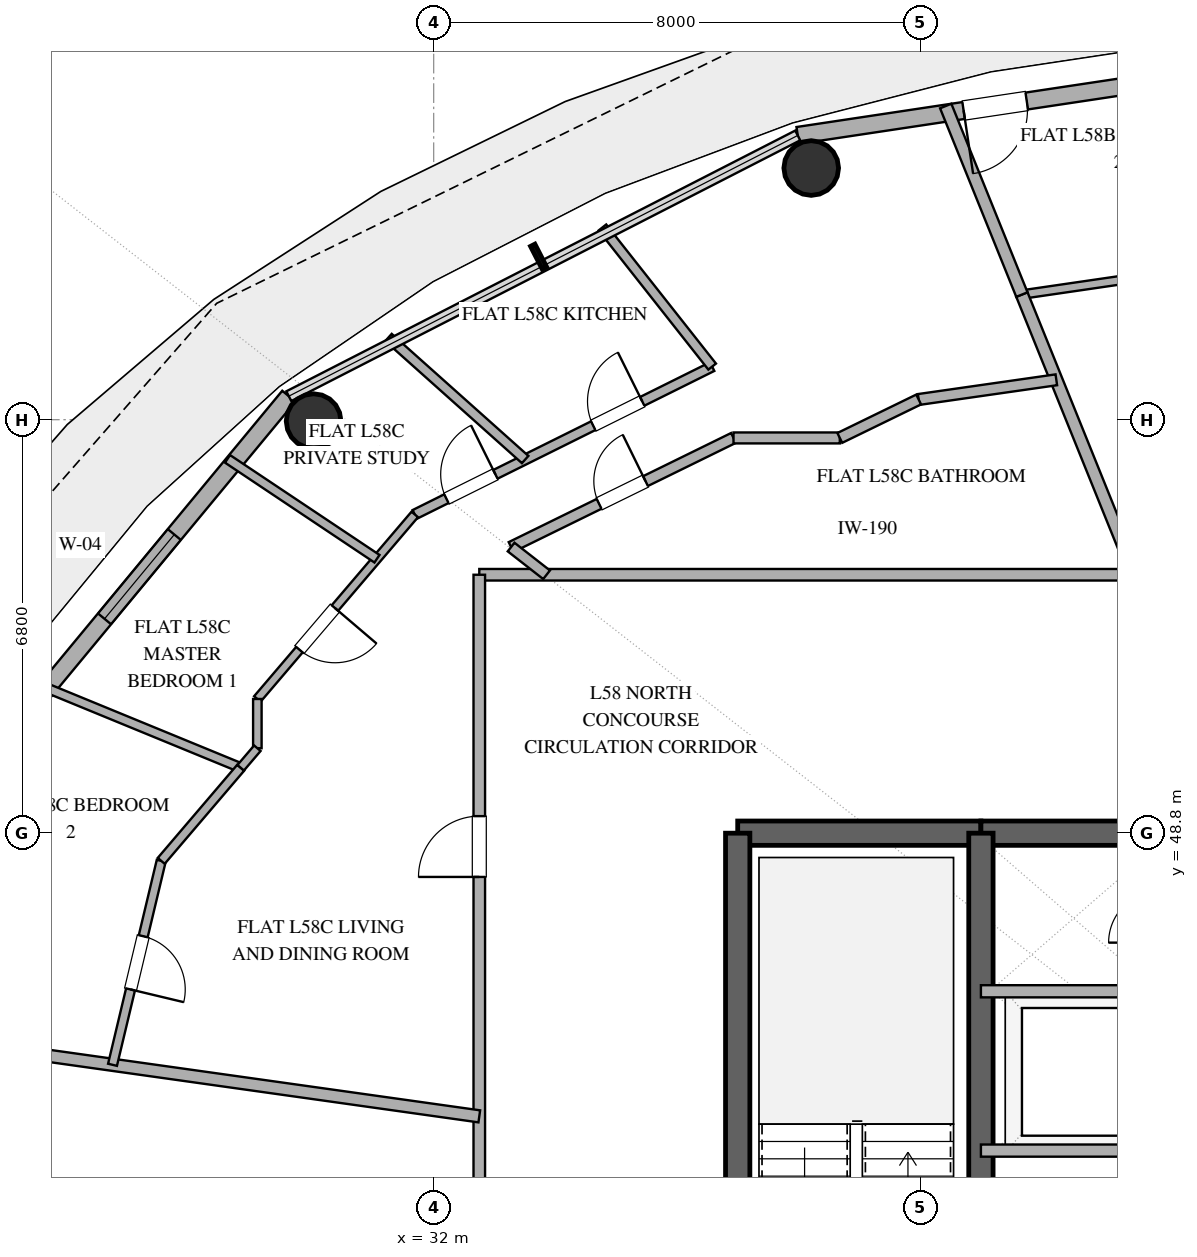
"""IFC4 building model, lengths in metres.
Left out: names, types, materials, properties, quantities, classifications, styles, units other than length and angle.
Written with IfcOpenShell. Run it as: python <this file> out.ifc"""

import sys

from ifc_helpers import new_model, si_unit, direction, frame, frame_2d, origin, origin_2d, place, context, subcontext, project, spatial, rectangle, hollow_circle, extrude, element, fill, save


model = new_model("IFC4")
c1 = context("Model", 3, precision=1e-05, world=origin(), true_north=direction((0.0, 1.0)))
c2 = subcontext(c1, "Body", "Model", "MODEL_VIEW")
j1 = project(units=[si_unit("LENGTHUNIT", "METRE"), si_unit("PLANEANGLEUNIT", "RADIAN")], contexts=[c1])
p1 = place(None, origin())
s1 = spatial("IfcSite", under=j1, at=p1, CompositionType="ELEMENT")
p2 = place(p1, origin())
s2 = spatial("IfcBuilding", under=s1, at=p2, CompositionType="ELEMENT")
p3 = place(p2, frame((0.0, 0.0, 228.0)))
s3 = spatial("IfcBuildingStorey", under=s2, at=p3, CompositionType="ELEMENT", Elevation=228.0)
p4 = place(p3, frame((37.0, 48.8, 0.0), z_axis=(0.0, 0.0, 1.0), x_axis=(1.0, 0.0, 0.0)))
e1 = element("IfcWall", 1, at=p4, inside=s3, PredefinedType="SHEAR", context=c2, shape_type="SweptSolid", body=[
    extrude(rectangle(XDim=4.0, YDim=0.4, at=frame_2d((2.0, 0.0))), origin(), (0.0, 0.0, 1.0), 3.36),
])
p5 = place(p3, frame((41.0, 48.8, 0.0), z_axis=(0.0, 0.0, 1.0), x_axis=(1.0, 0.0, 0.0)))
e2 = element("IfcWall", 2, at=p5, inside=s3, PredefinedType="SHEAR", context=c2, shape_type="SweptSolid", body=[
    extrude(rectangle(XDim=14.0, YDim=0.4, at=frame_2d((7.0, 0.0))), origin(), (0.0, 0.0, 1.0), 3.36),
])
p6 = place(p5, frame((6.1, 0.0, 0.0)))
e3 = element("IfcOpeningElement", 3, at=p6, cuts=e2, PredefinedType="OPENING", context=c2, shape_type="SweptSolid", body=[
    extrude(rectangle(XDim=1.8, YDim=2.25, at=frame_2d((0.9, 1.125))), frame((0.0, 0.21, 0.0), z_axis=(0.0, -1.0, 0.0), x_axis=(1.0, 0.0, 0.0)), (0.0, 0.0, 1.0), 0.42),
])
p7 = place(p3, frame((37.0, 35.2, 0.0), z_axis=(0.0, 0.0, 1.0), x_axis=(0.0, 1.0, 0.0)))
e4 = element("IfcWall", 4, at=p7, inside=s3, PredefinedType="SHEAR", context=c2, shape_type="SweptSolid", body=[
    extrude(rectangle(XDim=13.6, YDim=0.4, at=frame_2d((6.8, 0.0))), origin(), (0.0, 0.0, 1.0), 3.36),
])
p8 = place(p3, frame((41.0, 35.2, 0.0), z_axis=(0.0, 0.0, 1.0), x_axis=(0.0, 1.0, 0.0)))
e5 = element("IfcWall", 5, at=p8, inside=s3, PredefinedType="SHEAR", context=c2, shape_type="SweptSolid", body=[
    extrude(rectangle(XDim=13.6, YDim=0.4, at=frame_2d((6.8, 0.0))), origin(), (0.0, 0.0, 1.0), 3.36),
])
p9 = place(p8, frame((1.15, 0.0, 0.0)))
e6 = element("IfcOpeningElement", 6, at=p9, cuts=e5, PredefinedType="OPENING", context=c2, shape_type="SweptSolid", body=[
    extrude(rectangle(XDim=1.1, YDim=2.2, at=frame_2d((0.55, 1.1))), frame((0.0, 0.21, 0.0), z_axis=(0.0, -1.0, 0.0), x_axis=(1.0, 0.0, 0.0)), (0.0, 0.0, 1.0), 0.42),
])
for number, where, z_axis, x_axis in (
    (7, (38.209, 59.739, 0.0), (0.0, 0.0, 1.0), (1.0, 0.0, 0.0)),
    (8, (30.025, 55.576, 0.0), (0.0, 0.0, 1.0), (1.0, 0.0, 0.0)),
):
    element("IfcColumn", number, at=place(p3, frame(where, z_axis=z_axis, x_axis=x_axis)), inside=s3, PredefinedType="COLUMN", context=c2, shape_type="SweptSolid", body=[
        extrude(hollow_circle(Radius=0.45, WallThickness=0.025, at=origin_2d()), origin(), (0.0, 0.0, 1.0), 3.36),
    ])
p10 = place(p3, frame((48.0, 61.78, 0.0), z_axis=(0.0, 0.0, 1.0), x_axis=(-0.988882522213, -0.148698881169, 0.0)))
e9 = element("IfcWall", 9, at=p10, inside=s3, PredefinedType="SOLIDWALL", context=c2, shape_type="SweptSolid", body=[
    extrude(rectangle(XDim=10.125, YDim=0.28, at=frame_2d((5.062, 0.0))), origin(), (0.0, 0.0, 1.0), 3.36),
])
p11 = place(p10, frame((6.317, 0.0, 0.0)))
e10 = element("IfcOpeningElement", 10, at=p11, cuts=e9, PredefinedType="OPENING", context=c2, shape_type="SweptSolid", body=[
    extrude(rectangle(XDim=1.05, YDim=2.2, at=frame_2d((0.525, 1.1))), frame((0.0, 0.15, 0.0), z_axis=(0.0, -1.0, 0.0), x_axis=(1.0, 0.0, 0.0)), (0.0, 0.0, 1.0), 0.3),
])
p12 = place(p10, frame((0.866, 0.0, 0.85)))
e11 = element("IfcOpeningElement", 11, at=p12, cuts=e9, PredefinedType="OPENING", context=c2, shape_type="SweptSolid", body=[
    extrude(rectangle(XDim=1.0, YDim=1.8, at=frame_2d((0.5, 0.9))), frame((0.0, 0.15, 0.0), z_axis=(0.0, -1.0, 0.0), x_axis=(1.0, 0.0, 0.0)), (0.0, 0.0, 1.0), 0.3),
])
p13 = place(p3, frame((29.617, 55.987, 0.0), z_axis=(0.0, 0.0, 1.0), x_axis=(-0.63761509934, -0.770355103243, 0.0)))
e12 = element("IfcWall", 12, at=p13, inside=s3, PredefinedType="SOLIDWALL", context=c2, shape_type="SweptSolid", body=[
    extrude(rectangle(XDim=8.33, YDim=0.28, at=frame_2d((4.165, 0.0))), origin(), (0.0, 0.0, 1.0), 3.36),
])
p14 = place(p13, frame((2.953, 0.0, 0.85)))
e13 = element("IfcOpeningElement", 13, at=p14, cuts=e12, PredefinedType="OPENING", context=c2, shape_type="SweptSolid", body=[
    extrude(rectangle(XDim=1.8, YDim=2.2, at=frame_2d((0.9, 1.1))), frame((0.0, 0.15, 0.0), z_axis=(0.0, -1.0, 0.0), x_axis=(1.0, 0.0, 0.0)), (0.0, 0.0, 1.0), 0.3),
])
p15 = place(p13, frame((6.536, 0.0, 0.85)))
e14 = element("IfcOpeningElement", 14, at=p15, cuts=e12, PredefinedType="OPENING", context=c2, shape_type="SweptSolid", body=[
    extrude(rectangle(XDim=0.85, YDim=1.8, at=frame_2d((0.425, 0.9))), frame((0.0, 0.15, 0.0), z_axis=(0.0, -1.0, 0.0), x_axis=(1.0, 0.0, 0.0)), (0.0, 0.0, 1.0), 0.3),
])
for number, where, z_axis, x_axis in (
    (15, (41.0, 46.2, 0.0), (0.0, 0.0, 1.0), (1.0, 0.0, 0.0)),
    (16, (41.0, 43.58, 0.0), (0.0, 0.0, 1.0), (1.0, 0.0, 0.0)),
):
    element("IfcWall", number, at=place(p3, frame(where, z_axis=z_axis, x_axis=x_axis)), inside=s3, PredefinedType="SOLIDWALL", context=c2, shape_type="SweptSolid", body=[
        extrude(rectangle(XDim=2.95, YDim=0.2, at=frame_2d((1.475, 0.0))), origin(), (0.0, 0.0, 1.0), 2.72),
    ])
p16 = place(p3, frame((23.868, 45.392, 0.0), z_axis=(0.0, 0.0, 1.0), x_axis=(0.281018983641, -0.959702209455, 0.0)))
e17 = element("IfcWall", 17, at=p16, inside=s3, PredefinedType="PLUMBINGWALL", context=c2, shape_type="SweptSolid", body=[
    extrude(rectangle(XDim=10.036, YDim=0.16, at=frame_2d((5.018, 0.0))), origin(), (0.0, 0.0, 1.0), 2.72),
])
p17 = place(p16, frame((4.568, 0.0, 0.0)))
e18 = element("IfcOpeningElement", 18, at=p17, cuts=e17, PredefinedType="OPENING", context=c2, shape_type="SweptSolid", body=[
    extrude(rectangle(XDim=0.9, YDim=2.1, at=frame_2d((0.45, 1.05))), frame((0.0, 0.09, 0.0), z_axis=(0.0, -1.0, 0.0), x_axis=(1.0, 0.0, 0.0)), (0.0, 0.0, 1.0), 0.18),
])
p18 = place(p3, frame((32.75, 53.05, 0.0), z_axis=(0.0, 0.0, 1.0), x_axis=(1.0, 0.0, 0.0)))
e19 = element("IfcWall", 19, at=p18, inside=s3, PredefinedType="PARTITIONING", context=c2, shape_type="SweptSolid", body=[
    extrude(rectangle(XDim=12.766, YDim=0.19, at=frame_2d((6.383, 0.0))), origin(), (0.0, 0.0, 1.0), 2.72),
])
p19 = place(p3, frame((32.75, 42.243, 0.0), z_axis=(0.0, 0.0, 1.0), x_axis=(0.0, 1.0, 0.0)))
e20 = element("IfcWall", 20, at=p19, inside=s3, PredefinedType="PARTITIONING", context=c2, shape_type="SweptSolid", body=[
    extrude(rectangle(XDim=10.807, YDim=0.19, at=frame_2d((5.404, 0.0))), origin(), (0.0, 0.0, 1.0), 2.72),
])
p20 = place(p19, frame((5.837, 0.0, 0.0)))
e21 = element("IfcOpeningElement", 21, at=p20, cuts=e20, PredefinedType="OPENING", context=c2, shape_type="SweptSolid", body=[
    extrude(rectangle(XDim=1.0, YDim=2.2, at=frame_2d((0.5, 1.1))), frame((0.0, 0.105, 0.0), z_axis=(0.0, -1.0, 0.0), x_axis=(1.0, 0.0, 0.0)), (0.0, 0.0, 1.0), 0.21),
])
p21 = place(p3, frame((23.237, 45.48, 0.0), z_axis=(0.0, 0.0, 1.0), x_axis=(0.990269661234, -0.139161769316, 0.0)))
e22 = element("IfcWall", 22, at=p21, inside=s3, PredefinedType="PARTITIONING", context=c2, shape_type="SweptSolid", body=[
    extrude(rectangle(XDim=9.607, YDim=0.2, at=frame_2d((4.803, 0.0))), origin(), (0.0, 0.0, 1.0), 2.72),
])
p22 = place(p3, frame((41.674, 57.657, 0.0), z_axis=(0.0, 0.0, 1.0), x_axis=(0.989537524877, 0.144275732054, 0.0)))
e23 = element("IfcWall", 23, at=p22, inside=s3, PredefinedType="PARTITIONING", context=c2, shape_type="SweptSolid", body=[
    extrude(rectangle(XDim=6.393, YDim=0.14, at=frame_2d((3.197, 0.0))), origin(), (0.0, 0.0, 1.0), 2.72),
])
p23 = place(p22, frame((1.609, 0.0, 0.0)))
e24 = element("IfcOpeningElement", 24, at=p23, cuts=e23, PredefinedType="OPENING", context=c2, shape_type="SweptSolid", body=[
    extrude(rectangle(XDim=0.9, YDim=2.1, at=frame_2d((0.45, 1.05))), frame((0.0, 0.08, 0.0), z_axis=(0.0, -1.0, 0.0), x_axis=(1.0, 0.0, 0.0)), (0.0, 0.0, 1.0), 0.16),
])
p24 = place(p22, frame((4.789, 0.0, 0.0)))
e25 = element("IfcOpeningElement", 25, at=p24, cuts=e23, PredefinedType="OPENING", context=c2, shape_type="SweptSolid", body=[
    extrude(rectangle(XDim=0.9, YDim=2.1, at=frame_2d((0.45, 1.05))), frame((0.0, 0.08, 0.0), z_axis=(0.0, -1.0, 0.0), x_axis=(1.0, 0.0, 0.0)), (0.0, 0.0, 1.0), 0.16),
])
p25 = place(p3, frame((33.273, 53.506, 0.0), z_axis=(0.0, 0.0, 1.0), x_axis=(0.89778136281, 0.440441397454, 0.0)))
e26 = element("IfcWall", 26, at=p25, inside=s3, PredefinedType="PLUMBINGWALL", context=c2, shape_type="SweptSolid", body=[
    extrude(rectangle(XDim=4.074, YDim=0.18, at=frame_2d((2.037, 0.0))), origin(), (0.0, 0.0, 1.0), 2.72),
])
p26 = place(p25, frame((1.612, 0.0, 0.0)))
e27 = element("IfcOpeningElement", 27, at=p26, cuts=e26, PredefinedType="OPENING", context=c2, shape_type="SweptSolid", body=[
    extrude(rectangle(XDim=0.85, YDim=2.1, at=frame_2d((0.425, 1.05))), frame((0.0, 0.1, 0.0), z_axis=(0.0, -1.0, 0.0), x_axis=(1.0, 0.0, 0.0)), (0.0, 0.0, 1.0), 0.2),
])
p27 = place(p3, frame((25.531, 51.229, 0.0), z_axis=(0.0, 0.0, 1.0), x_axis=(0.925009924445, -0.37994294266, 0.0)))
e28 = element("IfcWall", 28, at=p27, inside=s3, PredefinedType="PARTITIONING", context=c2, shape_type="SweptSolid", body=[
    extrude(rectangle(XDim=3.562, YDim=0.15, at=frame_2d((1.781, 0.0))), origin(), (0.0, 0.0, 1.0), 2.72),
])
p28 = place(p3, frame((31.689, 54.042, 0.0), z_axis=(0.0, 0.0, 1.0), x_axis=(0.895479575413, 0.445102606168, 0.0)))
e29 = element("IfcWall", 29, at=p28, inside=s3, PredefinedType="PLUMBINGWALL", context=c2, shape_type="SweptSolid", body=[
    extrude(rectangle(XDim=5.462, YDim=0.16, at=frame_2d((2.731, 0.0))), origin(), (0.0, 0.0, 1.0), 2.72),
])
p29 = place(p28, frame((3.278, 0.0, 0.0)))
e30 = element("IfcOpeningElement", 30, at=p29, cuts=e29, PredefinedType="OPENING", context=c2, shape_type="SweptSolid", body=[
    extrude(rectangle(XDim=0.9, YDim=2.1, at=frame_2d((0.45, 1.05))), frame((0.0, 0.09, 0.0), z_axis=(0.0, -1.0, 0.0), x_axis=(1.0, 0.0, 0.0)), (0.0, 0.0, 1.0), 0.18),
])
p30 = place(p28, frame((0.581, 0.0, 0.0)))
e31 = element("IfcOpeningElement", 31, at=p30, cuts=e29, PredefinedType="OPENING", context=c2, shape_type="SweptSolid", body=[
    extrude(rectangle(XDim=0.9, YDim=2.1, at=frame_2d((0.45, 1.05))), frame((0.0, 0.09, 0.0), z_axis=(0.0, -1.0, 0.0), x_axis=(1.0, 0.0, 0.0)), (0.0, 0.0, 1.0), 0.18),
])
p31 = place(p3, frame((41.674, 57.657, 0.0), z_axis=(0.0, 0.0, 1.0), x_axis=(0.374573524941, -0.927197214412, 0.0)))
e32 = element("IfcWall", 32, at=p31, inside=s3, PredefinedType="PARTITIONING", context=c2, shape_type="SweptSolid", body=[
    extrude(rectangle(XDim=4.969, YDim=0.2, at=frame_2d((2.485, 0.0))), origin(), (0.0, 0.0, 1.0), 2.72),
])
p32 = place(p3, frame((27.519, 48.345, 0.0), z_axis=(0.0, 0.0, 1.0), x_axis=(-0.232293676314, -0.97264569497, 0.0)))
e33 = element("IfcWall", 33, at=p32, inside=s3, PredefinedType="PARTITIONING", context=c2, shape_type="SweptSolid", body=[
    extrude(rectangle(XDim=3.448, YDim=0.15, at=frame_2d((1.724, 0.0))), origin(), (0.0, 0.0, 1.0), 2.72),
])
p33 = place(p32, frame((1.274, 0.0, 0.0)))
e34 = element("IfcOpeningElement", 34, at=p33, cuts=e33, PredefinedType="OPENING", context=c2, shape_type="SweptSolid", body=[
    extrude(rectangle(XDim=0.9, YDim=2.1, at=frame_2d((0.45, 1.05))), frame((0.0, 0.085, 0.0), z_axis=(0.0, -1.0, 0.0), x_axis=(1.0, 0.0, 0.0)), (0.0, 0.0, 1.0), 0.17),
])
p34 = place(p3, frame((41.674, 57.657, 0.0), z_axis=(0.0, 0.0, 1.0), x_axis=(-0.374572886439, 0.927197472357, 0.0)))
e35 = element("IfcWall", 35, at=p34, inside=s3, PredefinedType="PARTITIONING", context=c2, shape_type="SweptSolid", body=[
    extrude(rectangle(XDim=3.344, YDim=0.2, at=frame_2d((1.672, 0.0))), origin(), (0.0, 0.0, 1.0), 2.72),
])
p35 = place(p3, frame((31.689, 54.042, 0.0), z_axis=(0.0, 0.0, 1.0), x_axis=(-0.648985159088, -0.760801066826, 0.0)))
e36 = element("IfcWall", 36, at=p35, inside=s3, PredefinedType="PARTITIONING", context=c2, shape_type="SweptSolid", body=[
    extrude(rectangle(XDim=3.989, YDim=0.14, at=frame_2d((1.995, 0.0))), origin(), (0.0, 0.0, 1.0), 2.72),
])
p36 = place(p35, frame((2.023, 0.0, 0.0)))
e37 = element("IfcOpeningElement", 37, at=p36, cuts=e36, PredefinedType="OPENING", context=c2, shape_type="SweptSolid", body=[
    extrude(rectangle(XDim=0.9, YDim=2.1, at=frame_2d((0.45, 1.05))), frame((0.0, 0.08, 0.0), z_axis=(0.0, -1.0, 0.0), x_axis=(1.0, 0.0, 0.0)), (0.0, 0.0, 1.0), 0.16),
])
p37 = place(p3, frame((33.505, 54.945, 0.0), z_axis=(0.0, 0.0, 1.0), x_axis=(-0.745914664094, 0.66604152565, 0.0)))
e38 = element("IfcWall", 38, at=p37, inside=s3, PredefinedType="PLUMBINGWALL", context=c2, shape_type="SweptSolid", body=[
    extrude(rectangle(XDim=3.014, YDim=0.16, at=frame_2d((1.507, 0.0))), origin(), (0.0, 0.0, 1.0), 2.72),
])
p38 = place(p3, frame((28.609, 54.956, 0.0), z_axis=(0.0, 0.0, 1.0), x_axis=(0.831478101563, -0.555557527733, 0.0)))
e39 = element("IfcWall", 39, at=p38, inside=s3, PredefinedType="PARTITIONING", context=c2, shape_type="SweptSolid", body=[
    extrude(rectangle(XDim=2.956, YDim=0.15, at=frame_2d((1.478, 0.0))), origin(), (0.0, 0.0, 1.0), 2.72),
])
p39 = place(p3, frame((36.58, 56.473, 0.0), z_axis=(0.0, 0.0, 1.0), x_axis=(-0.619378047354, 0.785092882694, 0.0)))
e40 = element("IfcWall", 40, at=p39, inside=s3, PredefinedType="PLUMBINGWALL", context=c2, shape_type="SweptSolid", body=[
    extrude(rectangle(XDim=2.914, YDim=0.16, at=frame_2d((1.457, 0.0))), origin(), (0.0, 0.0, 1.0), 2.72),
])
p40 = place(p3, frame((39.976, 55.932, 0.0), z_axis=(0.0, 0.0, 1.0), x_axis=(0.989917445937, 0.141645509032, 0.0)))
e41 = element("IfcWall", 41, at=p40, inside=s3, PredefinedType="PLUMBINGWALL", context=c2, shape_type="SweptSolid", body=[
    extrude(rectangle(XDim=2.287, YDim=0.18, at=frame_2d((1.144, 0.0))), origin(), (0.0, 0.0, 1.0), 2.72),
])
p41 = place(p3, frame((28.826, 49.876, 0.0), z_axis=(0.0, 0.0, 1.0), x_axis=(-0.649252114502, -0.760573265251, 0.0)))
e42 = element("IfcWall", 42, at=p41, inside=s3, PredefinedType="PARTITIONING", context=c2, shape_type="SweptSolid", body=[
    extrude(rectangle(XDim=2.013, YDim=0.15, at=frame_2d((1.007, 0.0))), origin(), (0.0, 0.0, 1.0), 2.72),
])
p42 = place(p3, frame((36.931, 55.3, 0.0), z_axis=(0.0, 0.0, 1.0), x_axis=(1.0, 0.0, 0.0)))
e43 = element("IfcWall", 43, at=p42, inside=s3, PredefinedType="PLUMBINGWALL", context=c2, shape_type="SweptSolid", body=[
    extrude(rectangle(XDim=1.748, YDim=0.18, at=frame_2d((0.874, 0.0))), origin(), (0.0, 0.0, 1.0), 2.72),
])
p43 = place(p3, frame((38.679, 55.3, 0.0), z_axis=(0.0, 0.0, 1.0), x_axis=(0.898916394035, 0.438120207861, 0.0)))
e44 = element("IfcWall", 44, at=p43, inside=s3, PredefinedType="PLUMBINGWALL", context=c2, shape_type="SweptSolid", body=[
    extrude(rectangle(XDim=1.443, YDim=0.18, at=frame_2d((0.721, 0.0))), origin(), (0.0, 0.0, 1.0), 2.72),
])
p44 = place(p3, frame((29.1, 51.007, 0.0), z_axis=(0.0, 0.0, 1.0), x_axis=(0.0, -1.0, 0.0)))
e45 = element("IfcWall", 45, at=p44, inside=s3, PredefinedType="PARTITIONING", context=c2, shape_type="SweptSolid", body=[
    extrude(rectangle(XDim=0.81, YDim=0.14, at=frame_2d((0.405, 0.0))), origin(), (0.0, 0.0, 1.0), 2.72),
])
p45 = place(p3, frame((33.857, 53.05, 0.0), z_axis=(0.0, 0.0, 1.0), x_axis=(-0.788214334349, 0.615400815019, 0.0)))
e46 = element("IfcWall", 46, at=p45, inside=s3, PredefinedType="PLUMBINGWALL", context=c2, shape_type="SweptSolid", body=[
    extrude(rectangle(XDim=0.74, YDim=0.18, at=frame_2d((0.37, 0.0))), origin(), (0.0, 0.0, 1.0), 2.72),
])
p46 = place(p3, frame((29.1, 50.197, 0.0), z_axis=(0.0, 0.0, 1.0), x_axis=(-0.649360360175, -0.760480849617, 0.0)))
e47 = element("IfcWall", 47, at=p46, inside=s3, PredefinedType="PARTITIONING", context=c2, shape_type="SweptSolid", body=[
    extrude(rectangle(XDim=0.422, YDim=0.14, at=frame_2d((0.211, 0.0))), origin(), (0.0, 0.0, 1.0), 2.72),
])
p47 = place(p11, origin())
e48 = element("IfcDoor", 48, at=p47, inside=s3, OperationType="SINGLE_SWING_RIGHT", PredefinedType="DOOR", context=c2, shape_type="SweptSolid", body=[
    extrude(rectangle(XDim=1.05, YDim=2.2, at=frame_2d((0.525, 1.1))), frame((0.0, 0.025, 0.0), z_axis=(0.0, -1.0, 0.0), x_axis=(1.0, 0.0, 0.0)), (0.0, 0.0, 1.0), 0.05),
])
fill(e10, e48)
p48 = place(p14, origin())
e49 = element("IfcWindow", 49, at=p48, inside=s3, PartitioningType="SINGLE_PANEL", PredefinedType="WINDOW", context=c2, shape_type="SweptSolid", body=[
    extrude(rectangle(XDim=1.8, YDim=2.2, at=frame_2d((0.9, 1.1))), frame((0.0, 0.03, 0.0), z_axis=(0.0, -1.0, 0.0), x_axis=(1.0, 0.0, 0.0)), (0.0, 0.0, 1.0), 0.06),
])
fill(e13, e49)
p49 = place(p20, origin())
e50 = element("IfcDoor", 50, at=p49, inside=s3, OperationType="SINGLE_SWING_LEFT", PredefinedType="DOOR", context=c2, shape_type="SweptSolid", body=[
    extrude(rectangle(XDim=1.0, YDim=2.2, at=frame_2d((0.5, 1.1))), frame((0.0, 0.025, 0.0), z_axis=(0.0, -1.0, 0.0), x_axis=(1.0, 0.0, 0.0)), (0.0, 0.0, 1.0), 0.05),
])
fill(e21, e50)
p50 = place(p26, origin())
e51 = element("IfcDoor", 51, at=p50, inside=s3, OperationType="SINGLE_SWING_RIGHT", PredefinedType="DOOR", context=c2, shape_type="SweptSolid", body=[
    extrude(rectangle(XDim=0.85, YDim=2.1, at=frame_2d((0.425, 1.05))), frame((0.0, 0.025, 0.0), z_axis=(0.0, -1.0, 0.0), x_axis=(1.0, 0.0, 0.0)), (0.0, 0.0, 1.0), 0.05),
])
fill(e27, e51)
p51 = place(p29, origin())
e52 = element("IfcDoor", 52, at=p51, inside=s3, OperationType="SINGLE_SWING_RIGHT", PredefinedType="DOOR", context=c2, shape_type="SweptSolid", body=[
    extrude(rectangle(XDim=0.9, YDim=2.1, at=frame_2d((0.45, 1.05))), frame((0.0, 0.025, 0.0), z_axis=(0.0, -1.0, 0.0), x_axis=(1.0, 0.0, 0.0)), (0.0, 0.0, 1.0), 0.05),
])
fill(e30, e52)
p52 = place(p30, origin())
e53 = element("IfcDoor", 53, at=p52, inside=s3, OperationType="SINGLE_SWING_RIGHT", PredefinedType="DOOR", context=c2, shape_type="SweptSolid", body=[
    extrude(rectangle(XDim=0.9, YDim=2.1, at=frame_2d((0.45, 1.05))), frame((0.0, 0.025, 0.0), z_axis=(0.0, -1.0, 0.0), x_axis=(1.0, 0.0, 0.0)), (0.0, 0.0, 1.0), 0.05),
])
fill(e31, e53)
p53 = place(p33, origin())
e54 = element("IfcDoor", 54, at=p53, inside=s3, OperationType="SINGLE_SWING_RIGHT", PredefinedType="DOOR", context=c2, shape_type="SweptSolid", body=[
    extrude(rectangle(XDim=0.9, YDim=2.1, at=frame_2d((0.45, 1.05))), frame((0.0, 0.025, 0.0), z_axis=(0.0, -1.0, 0.0), x_axis=(1.0, 0.0, 0.0)), (0.0, 0.0, 1.0), 0.05),
])
fill(e34, e54)
p54 = place(p36, origin())
e55 = element("IfcDoor", 55, at=p54, inside=s3, OperationType="SINGLE_SWING_LEFT", PredefinedType="DOOR", context=c2, shape_type="SweptSolid", body=[
    extrude(rectangle(XDim=0.9, YDim=2.1, at=frame_2d((0.45, 1.05))), frame((0.0, 0.025, 0.0), z_axis=(0.0, -1.0, 0.0), x_axis=(1.0, 0.0, 0.0)), (0.0, 0.0, 1.0), 0.05),
])
fill(e37, e55)
save(model, sys.argv[1])
